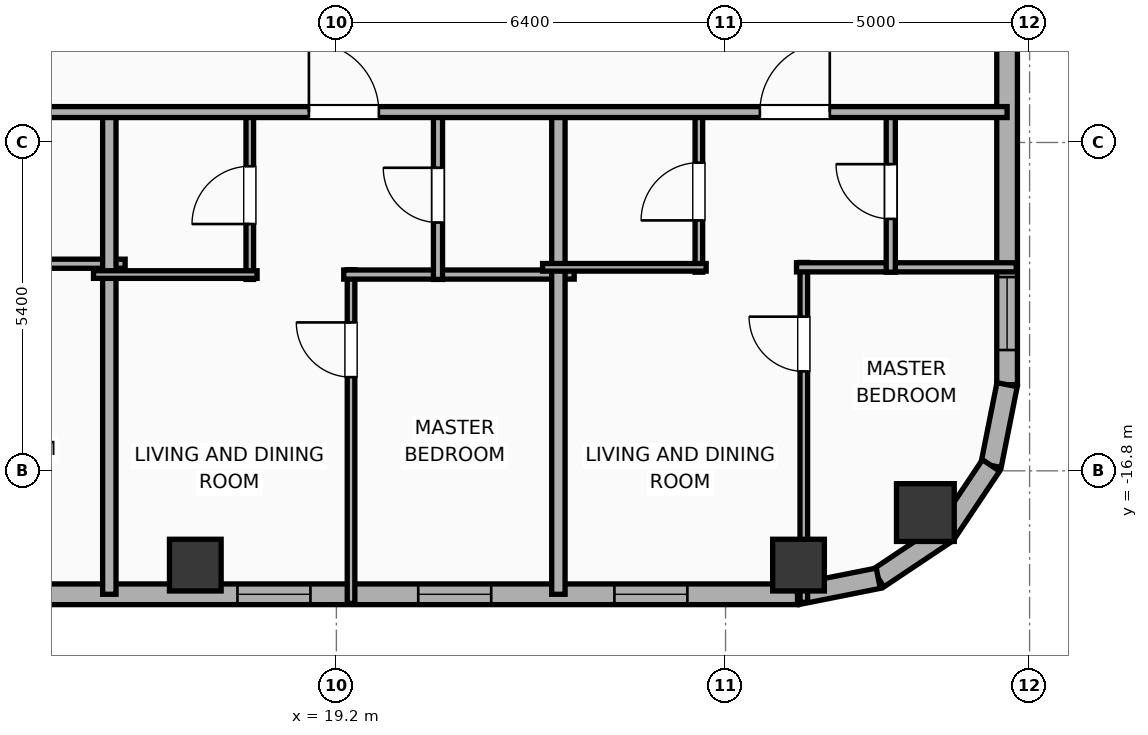
"""IFC4 building model, lengths in metres.
Left out: names, types, materials, properties, quantities, classifications, styles, units other than length and angle.
Written with IfcOpenShell. Run it as: python <this file> out.ifc"""

import sys

from ifc_helpers import new_model, si_unit, direction, frame, frame_2d, origin, origin_2d, place, context, subcontext, project, spatial, rectangle, hollow_rectangle, hollow_circle, extrude, element, fill, save


model = new_model("IFC4")
c1 = context("Model", 3, precision=1e-05, world=origin(), true_north=direction((0.0, 1.0)))
c2 = subcontext(c1, "Body", "Model", "MODEL_VIEW")
j1 = project(units=[si_unit("LENGTHUNIT", "METRE"), si_unit("PLANEANGLEUNIT", "RADIAN")], contexts=[c1])
p1 = place(None, origin())
s1 = spatial("IfcSite", under=j1, at=p1, CompositionType="ELEMENT")
p2 = place(p1, origin())
s2 = spatial("IfcBuilding", under=s1, at=p2, CompositionType="ELEMENT")
p3 = place(p2, frame((0.0, 0.0, 243.1)))
s3 = spatial("IfcBuildingStorey", under=s2, at=p3, CompositionType="ELEMENT", Elevation=243.1)
for number, where, z_axis, x_axis in (
    (1, (16.88, -18.35, 0.0), (0.0, 0.0, 1.0), (1.0, 0.0, 0.0)),
    (2, (26.8, -18.35, 0.0), (0.0, 0.0, 1.0), (1.0, 0.0, 0.0)),
):
    element("IfcColumn", number, at=place(p3, frame(where, z_axis=z_axis, x_axis=x_axis)), inside=s3, PredefinedType="COLUMN", context=c2, shape_type="SweptSolid", body=[
        extrude(hollow_rectangle(XDim=0.85, YDim=0.85, WallThickness=0.028, at=origin_2d()), origin(), (0.0, 0.0, 1.0), 3.9),
    ])
p4 = place(p3, frame((28.886, -17.486, 0.0), z_axis=(0.0, 0.0, 1.0), x_axis=(1.0, 0.0, 0.0)))
e3 = element("IfcColumn", 3, at=p4, inside=s3, PredefinedType="COLUMN", context=c2, shape_type="SweptSolid", body=[
    extrude(hollow_circle(Radius=0.475, WallThickness=0.032, at=origin_2d()), origin(), (0.0, 0.0, 1.0), 3.9),
])
p5 = place(p3, frame((26.783, -18.83, 0.0), z_axis=(0.0, 0.0, 1.0), x_axis=(-1.0, 0.0, 0.0)))
e4 = element("IfcWall", 4, at=p5, inside=s3, PredefinedType="ELEMENTEDWALL", context=c2, shape_type="SweptSolid", body=[
    extrude(rectangle(XDim=49.566, YDim=0.34, at=frame_2d((24.783, 0.0))), origin(), (0.0, 0.0, 1.0), 3.65),
])
p6 = place(p5, frame((23.583, 0.0, 0.75)))
e5 = element("IfcOpeningElement", 5, at=p6, cuts=e4, PredefinedType="OPENING", context=c2, shape_type="SweptSolid", body=[
    extrude(rectangle(XDim=2.4, YDim=2.1, at=frame_2d((1.2, 1.05))), frame((0.0, 0.18, 0.0), z_axis=(0.0, -1.0, 0.0), x_axis=(1.0, 0.0, 0.0)), (0.0, 0.0, 1.0), 0.36),
])
p7 = place(p5, frame((41.756, 0.0, 0.75)))
e6 = element("IfcOpeningElement", 6, at=p7, cuts=e4, PredefinedType="OPENING", context=c2, shape_type="SweptSolid", body=[
    extrude(rectangle(XDim=2.4, YDim=2.1, at=frame_2d((1.2, 1.05))), frame((0.0, 0.18, 0.0), z_axis=(0.0, -1.0, 0.0), x_axis=(1.0, 0.0, 0.0)), (0.0, 0.0, 1.0), 0.36),
])
p8 = place(p5, frame((47.222, 0.0, 0.75)))
e7 = element("IfcOpeningElement", 7, at=p8, cuts=e4, PredefinedType="OPENING", context=c2, shape_type="SweptSolid", body=[
    extrude(rectangle(XDim=1.2, YDim=2.05, at=frame_2d((0.6, 1.025))), frame((0.0, 0.18, 0.0), z_axis=(0.0, -1.0, 0.0), x_axis=(1.0, 0.0, 0.0)), (0.0, 0.0, 1.0), 0.36),
])
p9 = place(p5, frame((45.263, 0.0, 0.75)))
e8 = element("IfcOpeningElement", 8, at=p9, cuts=e4, PredefinedType="OPENING", context=c2, shape_type="SweptSolid", body=[
    extrude(rectangle(XDim=1.2, YDim=2.05, at=frame_2d((0.6, 1.025))), frame((0.0, 0.18, 0.0), z_axis=(0.0, -1.0, 0.0), x_axis=(1.0, 0.0, 0.0)), (0.0, 0.0, 1.0), 0.36),
])
p10 = place(p5, frame((37.289, 0.0, 0.75)))
e9 = element("IfcOpeningElement", 9, at=p10, cuts=e4, PredefinedType="OPENING", context=c2, shape_type="SweptSolid", body=[
    extrude(rectangle(XDim=1.2, YDim=2.05, at=frame_2d((0.6, 1.025))), frame((0.0, 0.18, 0.0), z_axis=(0.0, -1.0, 0.0), x_axis=(1.0, 0.0, 0.0)), (0.0, 0.0, 1.0), 0.36),
])
p11 = place(p5, frame((16.115, 0.0, 0.75)))
e10 = element("IfcOpeningElement", 10, at=p11, cuts=e4, PredefinedType="OPENING", context=c2, shape_type="SweptSolid", body=[
    extrude(rectangle(XDim=1.2, YDim=2.05, at=frame_2d((0.6, 1.025))), frame((0.0, 0.18, 0.0), z_axis=(0.0, -1.0, 0.0), x_axis=(1.0, 0.0, 0.0)), (0.0, 0.0, 1.0), 0.36),
])
p12 = place(p5, frame((12.422, 0.0, 0.75)))
e11 = element("IfcOpeningElement", 11, at=p12, cuts=e4, PredefinedType="OPENING", context=c2, shape_type="SweptSolid", body=[
    extrude(rectangle(XDim=1.2, YDim=2.05, at=frame_2d((0.6, 1.025))), frame((0.0, 0.18, 0.0), z_axis=(0.0, -1.0, 0.0), x_axis=(1.0, 0.0, 0.0)), (0.0, 0.0, 1.0), 0.36),
])
p13 = place(p5, frame((8.01, 0.0, 0.75)))
e12 = element("IfcOpeningElement", 12, at=p13, cuts=e4, PredefinedType="OPENING", context=c2, shape_type="SweptSolid", body=[
    extrude(rectangle(XDim=1.2, YDim=2.05, at=frame_2d((0.6, 1.025))), frame((0.0, 0.18, 0.0), z_axis=(0.0, -1.0, 0.0), x_axis=(1.0, 0.0, 0.0)), (0.0, 0.0, 1.0), 0.36),
])
p14 = place(p5, frame((5.037, 0.0, 0.75)))
e13 = element("IfcOpeningElement", 13, at=p14, cuts=e4, PredefinedType="OPENING", context=c2, shape_type="SweptSolid", body=[
    extrude(rectangle(XDim=1.2, YDim=2.05, at=frame_2d((0.6, 1.025))), frame((0.0, 0.18, 0.0), z_axis=(0.0, -1.0, 0.0), x_axis=(1.0, 0.0, 0.0)), (0.0, 0.0, 1.0), 0.36),
])
p15 = place(p5, frame((1.811, 0.0, 0.75)))
e14 = element("IfcOpeningElement", 14, at=p15, cuts=e4, PredefinedType="OPENING", context=c2, shape_type="SweptSolid", body=[
    extrude(rectangle(XDim=1.2, YDim=2.05, at=frame_2d((0.6, 1.025))), frame((0.0, 0.18, 0.0), z_axis=(0.0, -1.0, 0.0), x_axis=(1.0, 0.0, 0.0)), (0.0, 0.0, 1.0), 0.36),
])
p16 = place(p5, frame((32.253, 0.0, 0.75)))
e15 = element("IfcOpeningElement", 15, at=p16, cuts=e4, PredefinedType="OPENING", context=c2, shape_type="SweptSolid", body=[
    extrude(rectangle(XDim=1.2, YDim=2.05, at=frame_2d((0.6, 1.025))), frame((0.0, 0.18, 0.0), z_axis=(0.0, -1.0, 0.0), x_axis=(1.0, 0.0, 0.0)), (0.0, 0.0, 1.0), 0.36),
])
p17 = place(p5, frame((27.853, 0.0, 0.75)))
e16 = element("IfcOpeningElement", 16, at=p17, cuts=e4, PredefinedType="OPENING", context=c2, shape_type="SweptSolid", body=[
    extrude(rectangle(XDim=1.2, YDim=2.05, at=frame_2d((0.6, 1.025))), frame((0.0, 0.18, 0.0), z_axis=(0.0, -1.0, 0.0), x_axis=(1.0, 0.0, 0.0)), (0.0, 0.0, 1.0), 0.36),
])
p18 = place(p5, frame((20.473, 0.0, 0.75)))
e17 = element("IfcOpeningElement", 17, at=p18, cuts=e4, PredefinedType="OPENING", context=c2, shape_type="SweptSolid", body=[
    extrude(rectangle(XDim=1.2, YDim=2.05, at=frame_2d((0.6, 1.025))), frame((0.0, 0.18, 0.0), z_axis=(0.0, -1.0, 0.0), x_axis=(1.0, 0.0, 0.0)), (0.0, 0.0, 1.0), 0.36),
])
p19 = place(p3, frame((30.23, 16.583, 0.0), z_axis=(0.0, 0.0, 1.0), x_axis=(0.0, -1.0, 0.0)))
e18 = element("IfcWall", 18, at=p19, inside=s3, PredefinedType="ELEMENTEDWALL", context=c2, shape_type="SweptSolid", body=[
    extrude(rectangle(XDim=31.967, YDim=0.34, at=frame_2d((15.983, 0.0))), origin(), (0.0, 0.0, 1.0), 3.65),
])
p20 = place(p19, frame((30.196, 0.0, 0.75)))
e19 = element("IfcOpeningElement", 19, at=p20, cuts=e18, PredefinedType="OPENING", context=c2, shape_type="SweptSolid", body=[
    extrude(rectangle(XDim=1.2, YDim=2.05, at=frame_2d((0.6, 1.025))), frame((0.0, 0.18, 0.0), z_axis=(0.0, -1.0, 0.0), x_axis=(1.0, 0.0, 0.0)), (0.0, 0.0, 1.0), 0.36),
])
p21 = place(p19, frame((11.238, 0.0, 0.75)))
e20 = element("IfcOpeningElement", 20, at=p21, cuts=e18, PredefinedType="OPENING", context=c2, shape_type="SweptSolid", body=[
    extrude(rectangle(XDim=1.2, YDim=2.05, at=frame_2d((0.6, 1.025))), frame((0.0, 0.18, 0.0), z_axis=(0.0, -1.0, 0.0), x_axis=(1.0, 0.0, 0.0)), (0.0, 0.0, 1.0), 0.36),
])
p22 = place(p19, frame((20.588, 0.0, 0.75)))
e21 = element("IfcOpeningElement", 21, at=p22, cuts=e18, PredefinedType="OPENING", context=c2, shape_type="SweptSolid", body=[
    extrude(rectangle(XDim=1.2, YDim=2.05, at=frame_2d((0.6, 1.025))), frame((0.0, 0.18, 0.0), z_axis=(0.0, -1.0, 0.0), x_axis=(1.0, 0.0, 0.0)), (0.0, 0.0, 1.0), 0.36),
])
p23 = place(p3, frame((30.23, -15.383, 0.0), z_axis=(0.0, 0.0, 1.0), x_axis=(-0.195110379894, -0.98078129043, 0.0)))
e22 = element("IfcWall", 22, at=p23, inside=s3, PredefinedType="ELEMENTEDWALL", context=c2, shape_type="SweptSolid", body=[
    extrude(rectangle(XDim=1.354, YDim=0.34, at=frame_2d((0.677, 0.0))), origin(), (0.0, 0.0, 1.0), 3.65),
])
p24 = place(p3, frame((29.966, -16.711, 0.0), z_axis=(0.0, 0.0, 1.0), x_axis=(-0.555584683399, -0.831459956686, 0.0)))
e23 = element("IfcWall", 23, at=p24, inside=s3, PredefinedType="ELEMENTEDWALL", context=c2, shape_type="SweptSolid", body=[
    extrude(rectangle(XDim=1.337, YDim=0.34, at=frame_2d((0.668, 0.0))), origin(), (0.0, 0.0, 1.0), 3.65),
])
p25 = place(p3, frame((29.223, -17.823, 0.0), z_axis=(0.0, 0.0, 1.0), x_axis=(-0.831403586725, -0.555669034571, 0.0)))
e24 = element("IfcWall", 24, at=p25, inside=s3, PredefinedType="ELEMENTEDWALL", context=c2, shape_type="SweptSolid", body=[
    extrude(rectangle(XDim=1.337, YDim=0.34, at=frame_2d((0.668, 0.0))), origin(), (0.0, 0.0, 1.0), 3.65),
])
p26 = place(p3, frame((28.111, -18.566, 0.0), z_axis=(0.0, 0.0, 1.0), x_axis=(-0.980788153188, -0.195075878998, 0.0)))
e25 = element("IfcWall", 25, at=p26, inside=s3, PredefinedType="ELEMENTEDWALL", context=c2, shape_type="SweptSolid", body=[
    extrude(rectangle(XDim=1.354, YDim=0.34, at=frame_2d((0.677, 0.0))), origin(), (0.0, 0.0, 1.0), 3.65),
])
p27 = place(p3, frame((11.936, -13.394, 0.0), z_axis=(0.0, 0.0, 1.0), x_axis=(1.0, 0.0, 0.0)))
e26 = element("IfcWall", 26, at=p27, inside=s3, PredefinedType="PLUMBINGWALL", context=c2, shape_type="SweptSolid", body=[
    extrude(rectangle(XDim=3.79, YDim=0.15, at=frame_2d((1.895, 0.0))), origin(), (0.0, 0.0, 1.0), 3.65),
])
p28 = place(p3, frame((15.466, -18.83, 0.0), z_axis=(0.0, 0.0, 1.0), x_axis=(0.0, 1.0, 0.0)))
e27 = element("IfcWall", 27, at=p28, inside=s3, PredefinedType="PARTITIONING", context=c2, shape_type="SweptSolid", body=[
    extrude(rectangle(XDim=8.01, YDim=0.22, at=frame_2d((4.005, 0.0))), origin(), (0.0, 0.0, 1.0), 3.65),
])
p29 = place(p3, frame((19.441, -18.98, 0.0), z_axis=(0.0, 0.0, 1.0), x_axis=(0.0, 1.0, 0.0)))
e28 = element("IfcWall", 28, at=p29, inside=s3, PredefinedType="PARTITIONING", context=c2, shape_type="SweptSolid", body=[
    extrude(rectangle(XDim=5.488, YDim=0.125, at=frame_2d((2.744, 0.0))), origin(), (0.0, 0.0, 1.0), 3.65),
])
p30 = place(p29, frame((3.721, 0.0, 0.0)))
e29 = element("IfcOpeningElement", 29, at=p30, cuts=e28, PredefinedType="OPENING", context=c2, shape_type="SweptSolid", body=[
    extrude(rectangle(XDim=0.9, YDim=2.05, at=frame_2d((0.45, 1.025))), frame((0.0, 0.073, 0.0), z_axis=(0.0, -1.0, 0.0), x_axis=(1.0, 0.0, 0.0)), (0.0, 0.0, 1.0), 0.145),
])
p31 = place(p3, frame((19.321, -13.572, 0.0), z_axis=(0.0, 0.0, 1.0), x_axis=(1.0, 0.0, 0.0)))
e30 = element("IfcWall", 30, at=p31, inside=s3, PredefinedType="PLUMBINGWALL", context=c2, shape_type="SweptSolid", body=[
    extrude(rectangle(XDim=3.79, YDim=0.15, at=frame_2d((1.895, 0.0))), origin(), (0.0, 0.0, 1.0), 3.65),
])
p32 = place(p3, frame((17.776, -13.652, 0.0), z_axis=(0.0, 0.0, 1.0), x_axis=(0.0, 1.0, 0.0)))
e31 = element("IfcWall", 31, at=p32, inside=s3, PredefinedType="PARTITIONING", context=c2, shape_type="SweptSolid", body=[
    extrude(rectangle(XDim=2.772, YDim=0.125, at=frame_2d((1.386, 0.0))), origin(), (0.0, 0.0, 1.0), 3.65),
])
p33 = place(p32, frame((0.911, 0.0, 0.0)))
e32 = element("IfcOpeningElement", 32, at=p33, cuts=e31, PredefinedType="OPENING", context=c2, shape_type="SweptSolid", body=[
    extrude(rectangle(XDim=0.95, YDim=2.05, at=frame_2d((0.475, 1.025))), frame((0.0, 0.073, 0.0), z_axis=(0.0, -1.0, 0.0), x_axis=(1.0, 0.0, 0.0)), (0.0, 0.0, 1.0), 0.145),
])
p34 = place(p3, frame((15.206, -13.572, 0.0), z_axis=(0.0, 0.0, 1.0), x_axis=(1.0, 0.0, 0.0)))
e33 = element("IfcWall", 33, at=p34, inside=s3, PredefinedType="PARTITIONING", context=c2, shape_type="SweptSolid", body=[
    extrude(rectangle(XDim=2.69, YDim=0.125, at=frame_2d((1.345, 0.0))), origin(), (0.0, 0.0, 1.0), 3.65),
])
p35 = place(p3, frame((20.871, -13.652, 0.0), z_axis=(0.0, 0.0, 1.0), x_axis=(0.0, 1.0, 0.0)))
e34 = element("IfcWall", 34, at=p35, inside=s3, PredefinedType="PLUMBINGWALL", context=c2, shape_type="SweptSolid", body=[
    extrude(rectangle(XDim=2.772, YDim=0.15, at=frame_2d((1.386, 0.0))), origin(), (0.0, 0.0, 1.0), 3.65),
])
p36 = place(p35, frame((0.936, 0.0, 0.0)))
e35 = element("IfcOpeningElement", 35, at=p36, cuts=e34, PredefinedType="OPENING", context=c2, shape_type="SweptSolid", body=[
    extrude(rectangle(XDim=0.9, YDim=2.05, at=frame_2d((0.45, 1.025))), frame((0.0, 0.085, 0.0), z_axis=(0.0, -1.0, 0.0), x_axis=(1.0, 0.0, 0.0)), (0.0, 0.0, 1.0), 0.17),
])
p37 = place(p3, frame((22.851, -18.83, 0.0), z_axis=(0.0, 0.0, 1.0), x_axis=(0.0, 1.0, 0.0)))
e36 = element("IfcWall", 36, at=p37, inside=s3, PredefinedType="PARTITIONING", context=c2, shape_type="SweptSolid", body=[
    extrude(rectangle(XDim=8.01, YDim=0.22, at=frame_2d((4.005, 0.0))), origin(), (0.0, 0.0, 1.0), 3.65),
])
p38 = place(p3, frame((26.887, -18.962, 0.0), z_axis=(0.0, 0.0, 1.0), x_axis=(0.0, 1.0, 0.0)))
e37 = element("IfcWall", 37, at=p38, inside=s3, PredefinedType="PARTITIONING", context=c2, shape_type="SweptSolid", body=[
    extrude(rectangle(XDim=5.589, YDim=0.125, at=frame_2d((2.795, 0.0))), origin(), (0.0, 0.0, 1.0), 3.65),
])
p39 = place(p38, frame((3.798, 0.0, 0.0)))
e38 = element("IfcOpeningElement", 38, at=p39, cuts=e37, PredefinedType="OPENING", context=c2, shape_type="SweptSolid", body=[
    extrude(rectangle(XDim=0.9, YDim=2.05, at=frame_2d((0.45, 1.025))), frame((0.0, 0.073, 0.0), z_axis=(0.0, -1.0, 0.0), x_axis=(1.0, 0.0, 0.0)), (0.0, 0.0, 1.0), 0.145),
])
p40 = place(p3, frame((26.767, -13.453, 0.0), z_axis=(0.0, 0.0, 1.0), x_axis=(1.0, 0.0, 0.0)))
e39 = element("IfcWall", 39, at=p40, inside=s3, PredefinedType="PLUMBINGWALL", context=c2, shape_type="SweptSolid", body=[
    extrude(rectangle(XDim=3.613, YDim=0.15, at=frame_2d((1.806, 0.0))), origin(), (0.0, 0.0, 1.0), 3.65),
])
p41 = place(p3, frame((25.161, -13.533, 0.0), z_axis=(0.0, 0.0, 1.0), x_axis=(0.0, 1.0, 0.0)))
e40 = element("IfcWall", 40, at=p41, inside=s3, PredefinedType="PARTITIONING", context=c2, shape_type="SweptSolid", body=[
    extrude(rectangle(XDim=2.653, YDim=0.125, at=frame_2d((1.327, 0.0))), origin(), (0.0, 0.0, 1.0), 3.65),
])
p42 = place(p41, frame((0.852, 0.0, 0.0)))
e41 = element("IfcOpeningElement", 41, at=p42, cuts=e40, PredefinedType="OPENING", context=c2, shape_type="SweptSolid", body=[
    extrude(rectangle(XDim=0.95, YDim=2.05, at=frame_2d((0.475, 1.025))), frame((0.0, 0.073, 0.0), z_axis=(0.0, -1.0, 0.0), x_axis=(1.0, 0.0, 0.0)), (0.0, 0.0, 1.0), 0.145),
])
p43 = place(p3, frame((22.591, -13.453, 0.0), z_axis=(0.0, 0.0, 1.0), x_axis=(1.0, 0.0, 0.0)))
e42 = element("IfcWall", 42, at=p43, inside=s3, PredefinedType="PARTITIONING", context=c2, shape_type="SweptSolid", body=[
    extrude(rectangle(XDim=2.69, YDim=0.125, at=frame_2d((1.345, 0.0))), origin(), (0.0, 0.0, 1.0), 3.65),
])
p44 = place(p3, frame((28.317, -13.533, 0.0), z_axis=(0.0, 0.0, 1.0), x_axis=(0.0, 1.0, 0.0)))
e43 = element("IfcWall", 43, at=p44, inside=s3, PredefinedType="PLUMBINGWALL", context=c2, shape_type="SweptSolid", body=[
    extrude(rectangle(XDim=2.653, YDim=0.15, at=frame_2d((1.327, 0.0))), origin(), (0.0, 0.0, 1.0), 3.65),
])
p45 = place(p44, frame((0.876, 0.0, 0.0)))
e44 = element("IfcOpeningElement", 44, at=p45, cuts=e43, PredefinedType="OPENING", context=c2, shape_type="SweptSolid", body=[
    extrude(rectangle(XDim=0.9, YDim=2.05, at=frame_2d((0.45, 1.025))), frame((0.0, 0.085, 0.0), z_axis=(0.0, -1.0, 0.0), x_axis=(1.0, 0.0, 0.0)), (0.0, 0.0, 1.0), 0.17),
])
p46 = place(p3, frame((8.08, -10.9, 0.0), z_axis=(0.0, 0.0, 1.0), x_axis=(1.0, 0.0, 0.0)))
e45 = element("IfcWall", 45, at=p46, inside=s3, PredefinedType="PARTITIONING", context=c2, shape_type="SweptSolid", body=[
    extrude(rectangle(XDim=22.15, YDim=0.18, at=frame_2d((11.075, 0.0))), origin(), (0.0, 0.0, 1.0), 3.65),
])
p47 = place(p46, frame((3.283, 0.0, 0.0)))
e46 = element("IfcOpeningElement", 46, at=p47, cuts=e45, PredefinedType="OPENING", context=c2, shape_type="SweptSolid", body=[
    extrude(rectangle(XDim=1.15, YDim=2.05, at=frame_2d((0.575, 1.025))), frame((0.0, 0.1, 0.0), z_axis=(0.0, -1.0, 0.0), x_axis=(1.0, 0.0, 0.0)), (0.0, 0.0, 1.0), 0.2),
])
p48 = place(p46, frame((10.668, 0.0, 0.0)))
e47 = element("IfcOpeningElement", 47, at=p48, cuts=e45, PredefinedType="OPENING", context=c2, shape_type="SweptSolid", body=[
    extrude(rectangle(XDim=1.15, YDim=2.05, at=frame_2d((0.575, 1.025))), frame((0.0, 0.1, 0.0), z_axis=(0.0, -1.0, 0.0), x_axis=(1.0, 0.0, 0.0)), (0.0, 0.0, 1.0), 0.2),
])
p49 = place(p46, frame((18.084, 0.0, 0.0)))
e48 = element("IfcOpeningElement", 48, at=p49, cuts=e45, PredefinedType="OPENING", context=c2, shape_type="SweptSolid", body=[
    extrude(rectangle(XDim=1.15, YDim=2.05, at=frame_2d((0.575, 1.025))), frame((0.0, 0.1, 0.0), z_axis=(0.0, -1.0, 0.0), x_axis=(1.0, 0.0, 0.0)), (0.0, 0.0, 1.0), 0.2),
])
p50 = place(p13, origin())
e49 = element("IfcWindow", 49, at=p50, inside=s3, PartitioningType="SINGLE_PANEL", PredefinedType="WINDOW", context=c2, shape_type="SweptSolid", body=[
    extrude(rectangle(XDim=1.2, YDim=2.05, at=frame_2d((0.6, 1.025))), frame((0.0, 0.03, 0.0), z_axis=(0.0, -1.0, 0.0), x_axis=(1.0, 0.0, 0.0)), (0.0, 0.0, 1.0), 0.06),
])
fill(e12, e49)
p51 = place(p14, origin())
e50 = element("IfcWindow", 50, at=p51, inside=s3, PartitioningType="SINGLE_PANEL", PredefinedType="WINDOW", context=c2, shape_type="SweptSolid", body=[
    extrude(rectangle(XDim=1.2, YDim=2.05, at=frame_2d((0.6, 1.025))), frame((0.0, 0.03, 0.0), z_axis=(0.0, -1.0, 0.0), x_axis=(1.0, 0.0, 0.0)), (0.0, 0.0, 1.0), 0.06),
])
fill(e13, e50)
p52 = place(p15, origin())
e51 = element("IfcWindow", 51, at=p52, inside=s3, PartitioningType="SINGLE_PANEL", PredefinedType="WINDOW", context=c2, shape_type="SweptSolid", body=[
    extrude(rectangle(XDim=1.2, YDim=2.05, at=frame_2d((0.6, 1.025))), frame((0.0, 0.03, 0.0), z_axis=(0.0, -1.0, 0.0), x_axis=(1.0, 0.0, 0.0)), (0.0, 0.0, 1.0), 0.06),
])
fill(e14, e51)
p53 = place(p20, origin())
e52 = element("IfcWindow", 52, at=p53, inside=s3, PartitioningType="SINGLE_PANEL", PredefinedType="WINDOW", context=c2, shape_type="SweptSolid", body=[
    extrude(rectangle(XDim=1.2, YDim=2.05, at=frame_2d((0.6, 1.025))), frame((0.0, 0.03, 0.0), z_axis=(0.0, -1.0, 0.0), x_axis=(1.0, 0.0, 0.0)), (0.0, 0.0, 1.0), 0.06),
])
fill(e19, e52)
p54 = place(p30, origin())
e53 = element("IfcDoor", 53, at=p54, inside=s3, OperationType="SINGLE_SWING_RIGHT", PredefinedType="DOOR", context=c2, shape_type="SweptSolid", body=[
    extrude(rectangle(XDim=0.9, YDim=2.05, at=frame_2d((0.45, 1.025))), frame((0.0, 0.025, 0.0), z_axis=(0.0, -1.0, 0.0), x_axis=(1.0, 0.0, 0.0)), (0.0, 0.0, 1.0), 0.05),
])
fill(e29, e53)
p55 = place(p33, origin())
e54 = element("IfcDoor", 54, at=p55, inside=s3, OperationType="SINGLE_SWING_LEFT", PredefinedType="DOOR", context=c2, shape_type="SweptSolid", body=[
    extrude(rectangle(XDim=0.95, YDim=2.05, at=frame_2d((0.475, 1.025))), frame((0.0, 0.025, 0.0), z_axis=(0.0, -1.0, 0.0), x_axis=(1.0, 0.0, 0.0)), (0.0, 0.0, 1.0), 0.05),
])
fill(e32, e54)
p56 = place(p36, origin())
e55 = element("IfcDoor", 55, at=p56, inside=s3, OperationType="SINGLE_SWING_RIGHT", PredefinedType="DOOR", context=c2, shape_type="SweptSolid", body=[
    extrude(rectangle(XDim=0.9, YDim=2.05, at=frame_2d((0.45, 1.025))), frame((0.0, 0.025, 0.0), z_axis=(0.0, -1.0, 0.0), x_axis=(1.0, 0.0, 0.0)), (0.0, 0.0, 1.0), 0.05),
])
fill(e35, e55)
p57 = place(p39, origin())
e56 = element("IfcDoor", 56, at=p57, inside=s3, OperationType="SINGLE_SWING_RIGHT", PredefinedType="DOOR", context=c2, shape_type="SweptSolid", body=[
    extrude(rectangle(XDim=0.9, YDim=2.05, at=frame_2d((0.45, 1.025))), frame((0.0, 0.025, 0.0), z_axis=(0.0, -1.0, 0.0), x_axis=(1.0, 0.0, 0.0)), (0.0, 0.0, 1.0), 0.05),
])
fill(e38, e56)
p58 = place(p42, origin())
e57 = element("IfcDoor", 57, at=p58, inside=s3, OperationType="SINGLE_SWING_LEFT", PredefinedType="DOOR", context=c2, shape_type="SweptSolid", body=[
    extrude(rectangle(XDim=0.95, YDim=2.05, at=frame_2d((0.475, 1.025))), frame((0.0, 0.025, 0.0), z_axis=(0.0, -1.0, 0.0), x_axis=(1.0, 0.0, 0.0)), (0.0, 0.0, 1.0), 0.05),
])
fill(e41, e57)
p59 = place(p45, origin())
e58 = element("IfcDoor", 58, at=p59, inside=s3, OperationType="SINGLE_SWING_RIGHT", PredefinedType="DOOR", context=c2, shape_type="SweptSolid", body=[
    extrude(rectangle(XDim=0.9, YDim=2.05, at=frame_2d((0.45, 1.025))), frame((0.0, 0.025, 0.0), z_axis=(0.0, -1.0, 0.0), x_axis=(1.0, 0.0, 0.0)), (0.0, 0.0, 1.0), 0.05),
])
fill(e44, e58)
p60 = place(p48, origin())
e59 = element("IfcDoor", 59, at=p60, inside=s3, OperationType="SINGLE_SWING_LEFT", PredefinedType="DOOR", context=c2, shape_type="SweptSolid", body=[
    extrude(rectangle(XDim=1.15, YDim=2.05, at=frame_2d((0.575, 1.025))), frame((0.0, 0.025, 0.0), z_axis=(0.0, -1.0, 0.0), x_axis=(1.0, 0.0, 0.0)), (0.0, 0.0, 1.0), 0.05),
])
fill(e47, e59)
p61 = place(p49, origin())
e60 = element("IfcDoor", 60, at=p61, inside=s3, OperationType="SINGLE_SWING_RIGHT", PredefinedType="DOOR", context=c2, shape_type="SweptSolid", body=[
    extrude(rectangle(XDim=1.15, YDim=2.05, at=frame_2d((0.575, 1.025))), frame((0.0, 0.025, 0.0), z_axis=(0.0, -1.0, 0.0), x_axis=(1.0, 0.0, 0.0)), (0.0, 0.0, 1.0), 0.05),
])
fill(e48, e60)
save(model, sys.argv[1])
